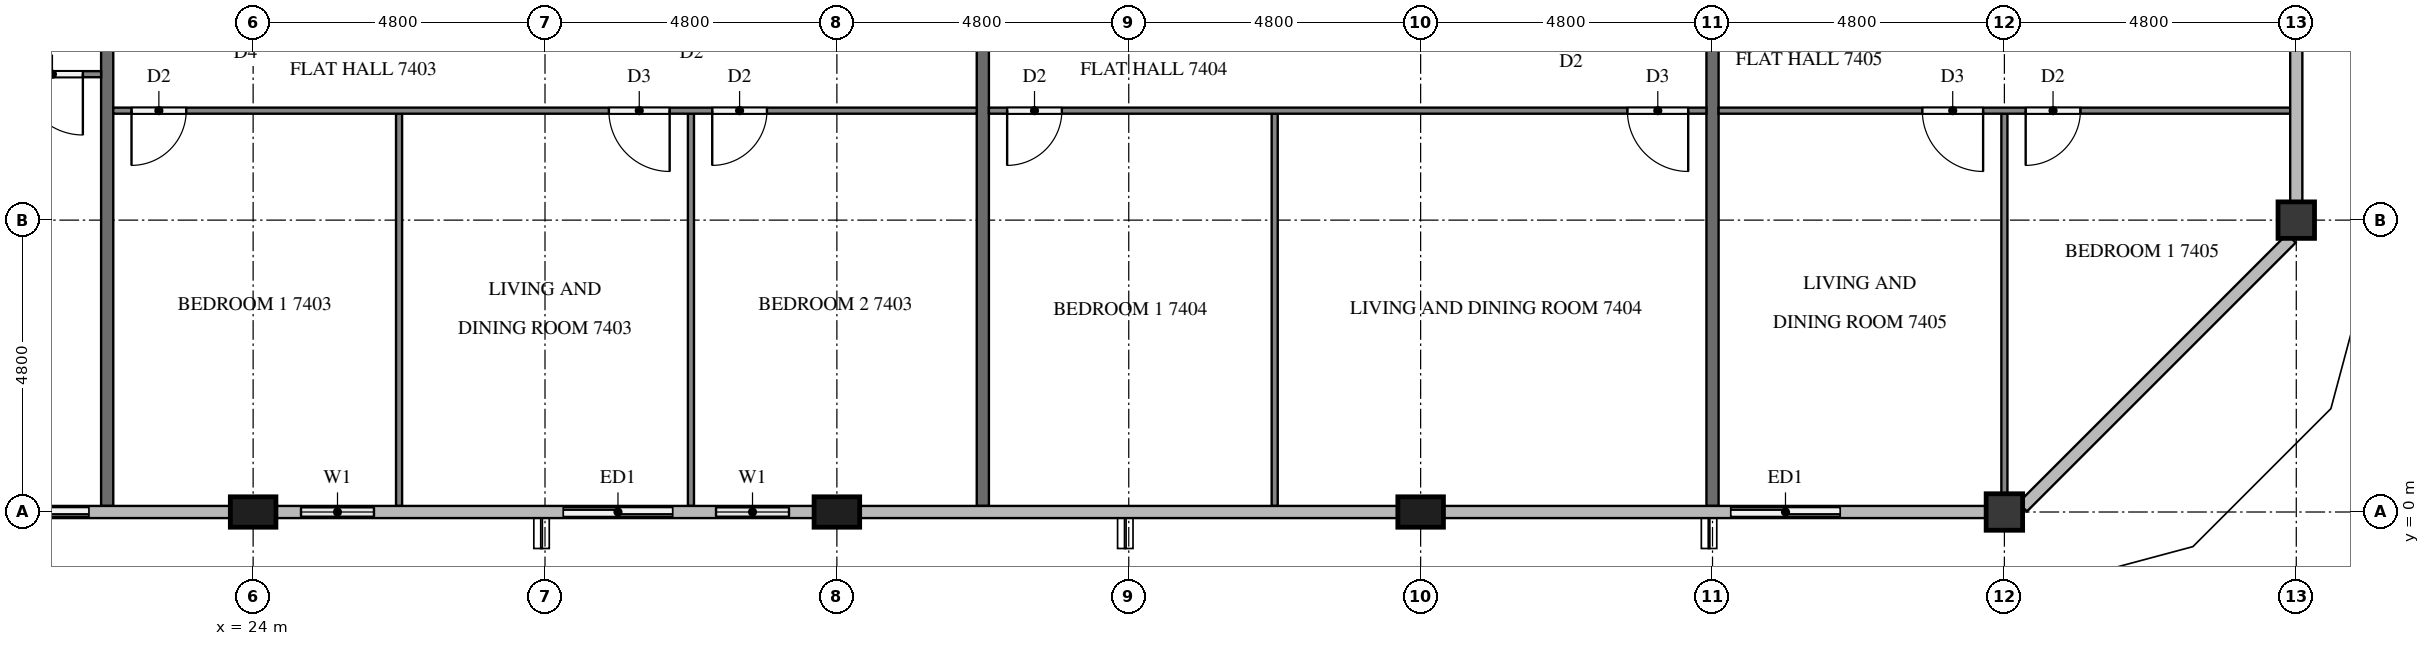
"""IFC4 building model, lengths in metres.
Left out: names, types, materials, properties, quantities, classifications, styles, units other than length and angle.
Written with IfcOpenShell. Run it as: python <this file> out.ifc"""

import sys

from ifc_helpers import new_model, si_unit, direction, frame, frame_2d, origin, origin_2d, place, context, subcontext, project, spatial, rectangle, extrude, element, fill, save


model = new_model("IFC4")
c1 = context("Model", 3, precision=1e-05, world=origin(), true_north=direction((0.0, 1.0)))
c2 = subcontext(c1, "Body", "Model", "MODEL_VIEW")
j1 = project(units=[si_unit("LENGTHUNIT", "METRE"), si_unit("PLANEANGLEUNIT", "RADIAN")], contexts=[c1])
p1 = place(None, origin())
s1 = spatial("IfcSite", under=j1, at=p1, CompositionType="ELEMENT")
p2 = place(p1, origin())
s2 = spatial("IfcBuilding", under=s1, at=p2, CompositionType="ELEMENT")
p3 = place(p2, frame((0.0, 0.0, 282.6)))
s3 = spatial("IfcBuildingStorey", under=s2, at=p3, CompositionType="ELEMENT", Elevation=282.6)
for number, where, z_axis, x_axis in (
    (1, (24.0, 0.0, 0.0), (0.0, 0.0, 1.0), (1.0, 0.0, 0.0)),
    (2, (33.6, 0.0, 0.0), (0.0, 0.0, 1.0), (1.0, 0.0, 0.0)),
    (3, (43.2, 0.0, 0.0), (0.0, 0.0, 1.0), (1.0, 0.0, 0.0)),
):
    element("IfcColumn", number, at=place(p3, frame(where, z_axis=z_axis, x_axis=x_axis)), inside=s3, PredefinedType="COLUMN", context=c2, shape_type="SweptSolid", body=[
        extrude(rectangle(XDim=0.75, YDim=0.5, at=origin_2d()), origin(), (0.0, 0.0, 1.0), 3.2),
    ])
for number, where, z_axis, x_axis in (
    (4, (52.8, 0.0, 0.0), (0.0, 0.0, 1.0), (1.0, 0.0, 0.0)),
    (5, (57.6, 4.8, 0.0), (0.0, 0.0, 1.0), (1.0, 0.0, 0.0)),
):
    element("IfcColumn", number, at=place(p3, frame(where, z_axis=z_axis, x_axis=x_axis)), inside=s3, PredefinedType="COLUMN", context=c2, shape_type="SweptSolid", body=[
        extrude(rectangle(XDim=0.6, YDim=0.6, at=origin_2d()), origin(), (0.0, 0.0, 1.0), 3.2),
    ])
p4 = place(p3, frame((19.2, 0.0, 0.0), z_axis=(0.0, 0.0, 1.0), x_axis=(1.0, 0.0, 0.0)))
e6 = element("IfcWall", 6, at=p4, inside=s3, PredefinedType="SOLIDWALL", context=c2, shape_type="SweptSolid", body=[
    extrude(rectangle(XDim=2.4, YDim=0.15, at=frame_2d((1.2, 0.0))), origin(), (0.0, 0.0, 1.0), 3.2),
])
p5 = place(p4, frame((0.3, 0.0, 0.0)))
e7 = element("IfcOpeningElement", 7, at=p5, cuts=e6, PredefinedType="OPENING", context=c2, shape_type="SweptSolid", body=[
    extrude(rectangle(XDim=1.8, YDim=2.4, at=frame_2d((0.9, 1.2))), frame((0.0, 0.085, 0.0), z_axis=(0.0, -1.0, 0.0), x_axis=(1.0, 0.0, 0.0)), (0.0, 0.0, 1.0), 0.17),
])
p6 = place(p3, frame((24.375, 0.0, 0.0), z_axis=(0.0, 0.0, 1.0), x_axis=(1.0, 0.0, 0.0)))
e8 = element("IfcWall", 8, at=p6, inside=s3, PredefinedType="SOLIDWALL", context=c2, shape_type="SweptSolid", body=[
    extrude(rectangle(XDim=2.025, YDim=0.15, at=frame_2d((1.012, 0.0))), origin(), (0.0, 0.0, 1.0), 3.2),
])
p7 = place(p6, frame((0.413, 0.0, 0.9)))
e9 = element("IfcOpeningElement", 9, at=p7, cuts=e8, PredefinedType="OPENING", context=c2, shape_type="SweptSolid", body=[
    extrude(rectangle(XDim=1.2, YDim=1.4, at=frame_2d((0.6, 0.7))), frame((0.0, 0.085, 0.0), z_axis=(0.0, -1.0, 0.0), x_axis=(1.0, 0.0, 0.0)), (0.0, 0.0, 1.0), 0.17),
])
p8 = place(p3, frame((28.8, 0.0, 0.0), z_axis=(0.0, 0.0, 1.0), x_axis=(1.0, 0.0, 0.0)))
e10 = element("IfcWall", 10, at=p8, inside=s3, PredefinedType="SOLIDWALL", context=c2, shape_type="SweptSolid", body=[
    extrude(rectangle(XDim=4.425, YDim=0.15, at=frame_2d((2.212, 0.0))), origin(), (0.0, 0.0, 1.0), 3.2),
])
p9 = place(p8, frame((0.3, 0.0, 0.0)))
e11 = element("IfcOpeningElement", 11, at=p9, cuts=e10, PredefinedType="OPENING", context=c2, shape_type="SweptSolid", body=[
    extrude(rectangle(XDim=1.8, YDim=2.4, at=frame_2d((0.9, 1.2))), frame((0.0, 0.085, 0.0), z_axis=(0.0, -1.0, 0.0), x_axis=(1.0, 0.0, 0.0)), (0.0, 0.0, 1.0), 0.17),
])
p10 = place(p8, frame((2.812, 0.0, 0.9)))
e12 = element("IfcOpeningElement", 12, at=p10, cuts=e10, PredefinedType="OPENING", context=c2, shape_type="SweptSolid", body=[
    extrude(rectangle(XDim=1.2, YDim=1.4, at=frame_2d((0.6, 0.7))), frame((0.0, 0.085, 0.0), z_axis=(0.0, -1.0, 0.0), x_axis=(1.0, 0.0, 0.0)), (0.0, 0.0, 1.0), 0.17),
])
p11 = place(p3, frame((48.0, 0.0, 0.0), z_axis=(0.0, 0.0, 1.0), x_axis=(1.0, 0.0, 0.0)))
e13 = element("IfcWall", 13, at=p11, inside=s3, PredefinedType="SOLIDWALL", context=c2, shape_type="SweptSolid", body=[
    extrude(rectangle(XDim=2.4, YDim=0.15, at=frame_2d((1.2, 0.0))), origin(), (0.0, 0.0, 1.0), 3.2),
])
p12 = place(p11, frame((0.3, 0.0, 0.0)))
e14 = element("IfcOpeningElement", 14, at=p12, cuts=e13, PredefinedType="OPENING", context=c2, shape_type="SweptSolid", body=[
    extrude(rectangle(XDim=1.8, YDim=2.4, at=frame_2d((0.9, 1.2))), frame((0.0, 0.085, 0.0), z_axis=(0.0, -1.0, 0.0), x_axis=(1.0, 0.0, 0.0)), (0.0, 0.0, 1.0), 0.17),
])
for number, where, z_axis, x_axis in (
    (15, (21.6, 11.9, 0.0), (0.0, 0.0, 1.0), (0.0, -1.0, 0.0)),
    (16, (36.0, 11.9, 0.0), (0.0, 0.0, 1.0), (0.0, -1.0, 0.0)),
    (17, (48.0, 11.9, 0.0), (0.0, 0.0, 1.0), (0.0, -1.0, 0.0)),
):
    element("IfcWall", number, at=place(p3, frame(where, z_axis=z_axis, x_axis=x_axis)), inside=s3, PredefinedType="PARTITIONING", context=c2, shape_type="SweptSolid", body=[
        extrude(rectangle(XDim=11.8, YDim=0.2, at=frame_2d((5.9, 0.0))), origin(), (0.0, 0.0, 1.0), 3.2),
    ])
p13 = place(p3, frame((21.5, 7.2, 0.0), z_axis=(0.0, 0.0, 1.0), x_axis=(-1.0, 0.0, 0.0)))
e18 = element("IfcWall", 18, at=p13, inside=s3, PredefinedType="PARTITIONING", context=c2, shape_type="SweptSolid", body=[
    extrude(rectangle(XDim=7.0, YDim=0.1, at=frame_2d((3.5, 0.0))), origin(), (0.0, 0.0, 1.0), 3.2),
])
p14 = place(p13, frame((0.3, 0.0, 0.0)))
e19 = element("IfcOpeningElement", 19, at=p14, cuts=e18, PredefinedType="OPENING", context=c2, shape_type="SweptSolid", body=[
    extrude(rectangle(XDim=1.0, YDim=2.1, at=frame_2d((0.5, 1.05))), frame((0.0, 0.06, 0.0), z_axis=(0.0, -1.0, 0.0), x_axis=(1.0, 0.0, 0.0)), (0.0, 0.0, 1.0), 0.12),
])
for number, where, z_axis, x_axis in (
    (20, (26.4, 6.55, 0.0), (0.0, 0.0, 1.0), (0.0, -1.0, 0.0)),
    (21, (31.2, 6.55, 0.0), (0.0, 0.0, 1.0), (0.0, -1.0, 0.0)),
):
    element("IfcWall", number, at=place(p3, frame(where, z_axis=z_axis, x_axis=x_axis)), inside=s3, PredefinedType="PARTITIONING", context=c2, shape_type="SweptSolid", body=[
        extrude(rectangle(XDim=6.45, YDim=0.1, at=frame_2d((3.225, 0.0))), origin(), (0.0, 0.0, 1.0), 3.2),
    ])
p15 = place(p3, frame((35.9, 6.6, 0.0), z_axis=(0.0, 0.0, 1.0), x_axis=(-1.0, 0.0, 0.0)))
e22 = element("IfcWall", 22, at=p15, inside=s3, PredefinedType="PARTITIONING", context=c2, shape_type="SweptSolid", body=[
    extrude(rectangle(XDim=14.2, YDim=0.1, at=frame_2d((7.1, 0.0))), origin(), (0.0, 0.0, 1.0), 3.2),
])
p16 = place(p15, frame((13.0, 0.0, 0.0)))
e23 = element("IfcOpeningElement", 23, at=p16, cuts=e22, PredefinedType="OPENING", context=c2, shape_type="SweptSolid", body=[
    extrude(rectangle(XDim=0.9, YDim=2.1, at=frame_2d((0.45, 1.05))), frame((0.0, 0.06, 0.0), z_axis=(0.0, -1.0, 0.0), x_axis=(1.0, 0.0, 0.0)), (0.0, 0.0, 1.0), 0.12),
])
p17 = place(p15, frame((5.05, 0.0, 0.0)))
e24 = element("IfcOpeningElement", 24, at=p17, cuts=e22, PredefinedType="OPENING", context=c2, shape_type="SweptSolid", body=[
    extrude(rectangle(XDim=1.0, YDim=2.1, at=frame_2d((0.5, 1.05))), frame((0.0, 0.06, 0.0), z_axis=(0.0, -1.0, 0.0), x_axis=(1.0, 0.0, 0.0)), (0.0, 0.0, 1.0), 0.12),
])
p18 = place(p15, frame((3.45, 0.0, 0.0)))
e25 = element("IfcOpeningElement", 25, at=p18, cuts=e22, PredefinedType="OPENING", context=c2, shape_type="SweptSolid", body=[
    extrude(rectangle(XDim=0.9, YDim=2.1, at=frame_2d((0.45, 1.05))), frame((0.0, 0.06, 0.0), z_axis=(0.0, -1.0, 0.0), x_axis=(1.0, 0.0, 0.0)), (0.0, 0.0, 1.0), 0.12),
])
p19 = place(p3, frame((40.8, 6.55, 0.0), z_axis=(0.0, 0.0, 1.0), x_axis=(0.0, -1.0, 0.0)))
e26 = element("IfcWall", 26, at=p19, inside=s3, PredefinedType="PARTITIONING", context=c2, shape_type="SweptSolid", body=[
    extrude(rectangle(XDim=6.45, YDim=0.1, at=frame_2d((3.225, 0.0))), origin(), (0.0, 0.0, 1.0), 3.2),
])
p20 = place(p3, frame((47.9, 6.6, 0.0), z_axis=(0.0, 0.0, 1.0), x_axis=(-1.0, 0.0, 0.0)))
e27 = element("IfcWall", 27, at=p20, inside=s3, PredefinedType="PARTITIONING", context=c2, shape_type="SweptSolid", body=[
    extrude(rectangle(XDim=11.8, YDim=0.1, at=frame_2d((5.9, 0.0))), origin(), (0.0, 0.0, 1.0), 3.2),
])
p21 = place(p20, frame((0.3, 0.0, 0.0)))
e28 = element("IfcOpeningElement", 28, at=p21, cuts=e27, PredefinedType="OPENING", context=c2, shape_type="SweptSolid", body=[
    extrude(rectangle(XDim=1.0, YDim=2.1, at=frame_2d((0.5, 1.05))), frame((0.0, 0.06, 0.0), z_axis=(0.0, -1.0, 0.0), x_axis=(1.0, 0.0, 0.0)), (0.0, 0.0, 1.0), 0.12),
])
p22 = place(p20, frame((10.6, 0.0, 0.0)))
e29 = element("IfcOpeningElement", 29, at=p22, cuts=e27, PredefinedType="OPENING", context=c2, shape_type="SweptSolid", body=[
    extrude(rectangle(XDim=0.9, YDim=2.1, at=frame_2d((0.45, 1.05))), frame((0.0, 0.06, 0.0), z_axis=(0.0, -1.0, 0.0), x_axis=(1.0, 0.0, 0.0)), (0.0, 0.0, 1.0), 0.12),
])
p23 = place(p3, frame((52.8, 6.55, 0.0), z_axis=(0.0, 0.0, 1.0), x_axis=(0.0, -1.0, 0.0)))
e30 = element("IfcWall", 30, at=p23, inside=s3, PredefinedType="PARTITIONING", context=c2, shape_type="SweptSolid", body=[
    extrude(rectangle(XDim=6.25, YDim=0.1, at=frame_2d((3.125, 0.0))), origin(), (0.0, 0.0, 1.0), 3.2),
])
p24 = place(p3, frame((57.5, 6.6, 0.0), z_axis=(0.0, 0.0, 1.0), x_axis=(-1.0, 0.0, 0.0)))
e31 = element("IfcWall", 31, at=p24, inside=s3, PredefinedType="PARTITIONING", context=c2, shape_type="SweptSolid", body=[
    extrude(rectangle(XDim=9.4, YDim=0.1, at=frame_2d((4.7, 0.0))), origin(), (0.0, 0.0, 1.0), 3.2),
])
p25 = place(p24, frame((5.05, 0.0, 0.0)))
e32 = element("IfcOpeningElement", 32, at=p25, cuts=e31, PredefinedType="OPENING", context=c2, shape_type="SweptSolid", body=[
    extrude(rectangle(XDim=1.0, YDim=2.1, at=frame_2d((0.5, 1.05))), frame((0.0, 0.06, 0.0), z_axis=(0.0, -1.0, 0.0), x_axis=(1.0, 0.0, 0.0)), (0.0, 0.0, 1.0), 0.12),
])
p26 = place(p24, frame((3.45, 0.0, 0.0)))
e33 = element("IfcOpeningElement", 33, at=p26, cuts=e31, PredefinedType="OPENING", context=c2, shape_type="SweptSolid", body=[
    extrude(rectangle(XDim=0.9, YDim=2.1, at=frame_2d((0.45, 1.05))), frame((0.0, 0.06, 0.0), z_axis=(0.0, -1.0, 0.0), x_axis=(1.0, 0.0, 0.0)), (0.0, 0.0, 1.0), 0.12),
])
p27 = place(p5, origin())
e34 = element("IfcDoor", 34, at=p27, inside=s3, OperationType="SLIDING_TO_LEFT", PredefinedType="DOOR", context=c2, shape_type="SweptSolid", body=[
    extrude(rectangle(XDim=1.8, YDim=2.4, at=frame_2d((0.9, 1.2))), frame((0.0, 0.025, 0.0), z_axis=(0.0, -1.0, 0.0), x_axis=(1.0, 0.0, 0.0)), (0.0, 0.0, 1.0), 0.05),
])
fill(e7, e34)
p28 = place(p7, origin())
e35 = element("IfcWindow", 35, at=p28, inside=s3, PartitioningType="SINGLE_PANEL", PredefinedType="WINDOW", context=c2, shape_type="SweptSolid", body=[
    extrude(rectangle(XDim=1.2, YDim=1.4, at=frame_2d((0.6, 0.7))), frame((0.0, 0.03, 0.0), z_axis=(0.0, -1.0, 0.0), x_axis=(1.0, 0.0, 0.0)), (0.0, 0.0, 1.0), 0.06),
])
fill(e9, e35)
p29 = place(p9, origin())
e36 = element("IfcDoor", 36, at=p29, inside=s3, OperationType="SLIDING_TO_RIGHT", PredefinedType="DOOR", context=c2, shape_type="SweptSolid", body=[
    extrude(rectangle(XDim=1.8, YDim=2.4, at=frame_2d((0.9, 1.2))), frame((0.0, 0.025, 0.0), z_axis=(0.0, -1.0, 0.0), x_axis=(1.0, 0.0, 0.0)), (0.0, 0.0, 1.0), 0.05),
])
fill(e11, e36)
p30 = place(p10, origin())
e37 = element("IfcWindow", 37, at=p30, inside=s3, PartitioningType="SINGLE_PANEL", PredefinedType="WINDOW", context=c2, shape_type="SweptSolid", body=[
    extrude(rectangle(XDim=1.2, YDim=1.4, at=frame_2d((0.6, 0.7))), frame((0.0, 0.03, 0.0), z_axis=(0.0, -1.0, 0.0), x_axis=(1.0, 0.0, 0.0)), (0.0, 0.0, 1.0), 0.06),
])
fill(e12, e37)
p31 = place(p12, origin())
e38 = element("IfcDoor", 38, at=p31, inside=s3, OperationType="SLIDING_TO_LEFT", PredefinedType="DOOR", context=c2, shape_type="SweptSolid", body=[
    extrude(rectangle(XDim=1.8, YDim=2.4, at=frame_2d((0.9, 1.2))), frame((0.0, 0.025, 0.0), z_axis=(0.0, -1.0, 0.0), x_axis=(1.0, 0.0, 0.0)), (0.0, 0.0, 1.0), 0.05),
])
fill(e14, e38)
p32 = place(p14, origin())
e39 = element("IfcDoor", 39, at=p32, inside=s3, OperationType="SINGLE_SWING_LEFT", PredefinedType="DOOR", context=c2, shape_type="SweptSolid", body=[
    extrude(rectangle(XDim=1.0, YDim=2.1, at=frame_2d((0.5, 1.05))), frame((0.0, 0.025, 0.0), z_axis=(0.0, -1.0, 0.0), x_axis=(1.0, 0.0, 0.0)), (0.0, 0.0, 1.0), 0.05),
])
fill(e19, e39)
p33 = place(p16, origin())
e40 = element("IfcDoor", 40, at=p33, inside=s3, OperationType="SINGLE_SWING_RIGHT", PredefinedType="DOOR", context=c2, shape_type="SweptSolid", body=[
    extrude(rectangle(XDim=0.9, YDim=2.1, at=frame_2d((0.45, 1.05))), frame((0.0, 0.025, 0.0), z_axis=(0.0, -1.0, 0.0), x_axis=(1.0, 0.0, 0.0)), (0.0, 0.0, 1.0), 0.05),
])
fill(e23, e40)
p34 = place(p17, origin())
e41 = element("IfcDoor", 41, at=p34, inside=s3, OperationType="SINGLE_SWING_LEFT", PredefinedType="DOOR", context=c2, shape_type="SweptSolid", body=[
    extrude(rectangle(XDim=1.0, YDim=2.1, at=frame_2d((0.5, 1.05))), frame((0.0, 0.025, 0.0), z_axis=(0.0, -1.0, 0.0), x_axis=(1.0, 0.0, 0.0)), (0.0, 0.0, 1.0), 0.05),
])
fill(e24, e41)
p35 = place(p18, origin())
e42 = element("IfcDoor", 42, at=p35, inside=s3, OperationType="SINGLE_SWING_RIGHT", PredefinedType="DOOR", context=c2, shape_type="SweptSolid", body=[
    extrude(rectangle(XDim=0.9, YDim=2.1, at=frame_2d((0.45, 1.05))), frame((0.0, 0.025, 0.0), z_axis=(0.0, -1.0, 0.0), x_axis=(1.0, 0.0, 0.0)), (0.0, 0.0, 1.0), 0.05),
])
fill(e25, e42)
p36 = place(p21, origin())
e43 = element("IfcDoor", 43, at=p36, inside=s3, OperationType="SINGLE_SWING_LEFT", PredefinedType="DOOR", context=c2, shape_type="SweptSolid", body=[
    extrude(rectangle(XDim=1.0, YDim=2.1, at=frame_2d((0.5, 1.05))), frame((0.0, 0.025, 0.0), z_axis=(0.0, -1.0, 0.0), x_axis=(1.0, 0.0, 0.0)), (0.0, 0.0, 1.0), 0.05),
])
fill(e28, e43)
p37 = place(p22, origin())
e44 = element("IfcDoor", 44, at=p37, inside=s3, OperationType="SINGLE_SWING_RIGHT", PredefinedType="DOOR", context=c2, shape_type="SweptSolid", body=[
    extrude(rectangle(XDim=0.9, YDim=2.1, at=frame_2d((0.45, 1.05))), frame((0.0, 0.025, 0.0), z_axis=(0.0, -1.0, 0.0), x_axis=(1.0, 0.0, 0.0)), (0.0, 0.0, 1.0), 0.05),
])
fill(e29, e44)
p38 = place(p25, origin())
e45 = element("IfcDoor", 45, at=p38, inside=s3, OperationType="SINGLE_SWING_LEFT", PredefinedType="DOOR", context=c2, shape_type="SweptSolid", body=[
    extrude(rectangle(XDim=1.0, YDim=2.1, at=frame_2d((0.5, 1.05))), frame((0.0, 0.025, 0.0), z_axis=(0.0, -1.0, 0.0), x_axis=(1.0, 0.0, 0.0)), (0.0, 0.0, 1.0), 0.05),
])
fill(e32, e45)
p39 = place(p26, origin())
e46 = element("IfcDoor", 46, at=p39, inside=s3, OperationType="SINGLE_SWING_RIGHT", PredefinedType="DOOR", context=c2, shape_type="SweptSolid", body=[
    extrude(rectangle(XDim=0.9, YDim=2.1, at=frame_2d((0.45, 1.05))), frame((0.0, 0.025, 0.0), z_axis=(0.0, -1.0, 0.0), x_axis=(1.0, 0.0, 0.0)), (0.0, 0.0, 1.0), 0.05),
])
fill(e33, e46)
save(model, sys.argv[1])
